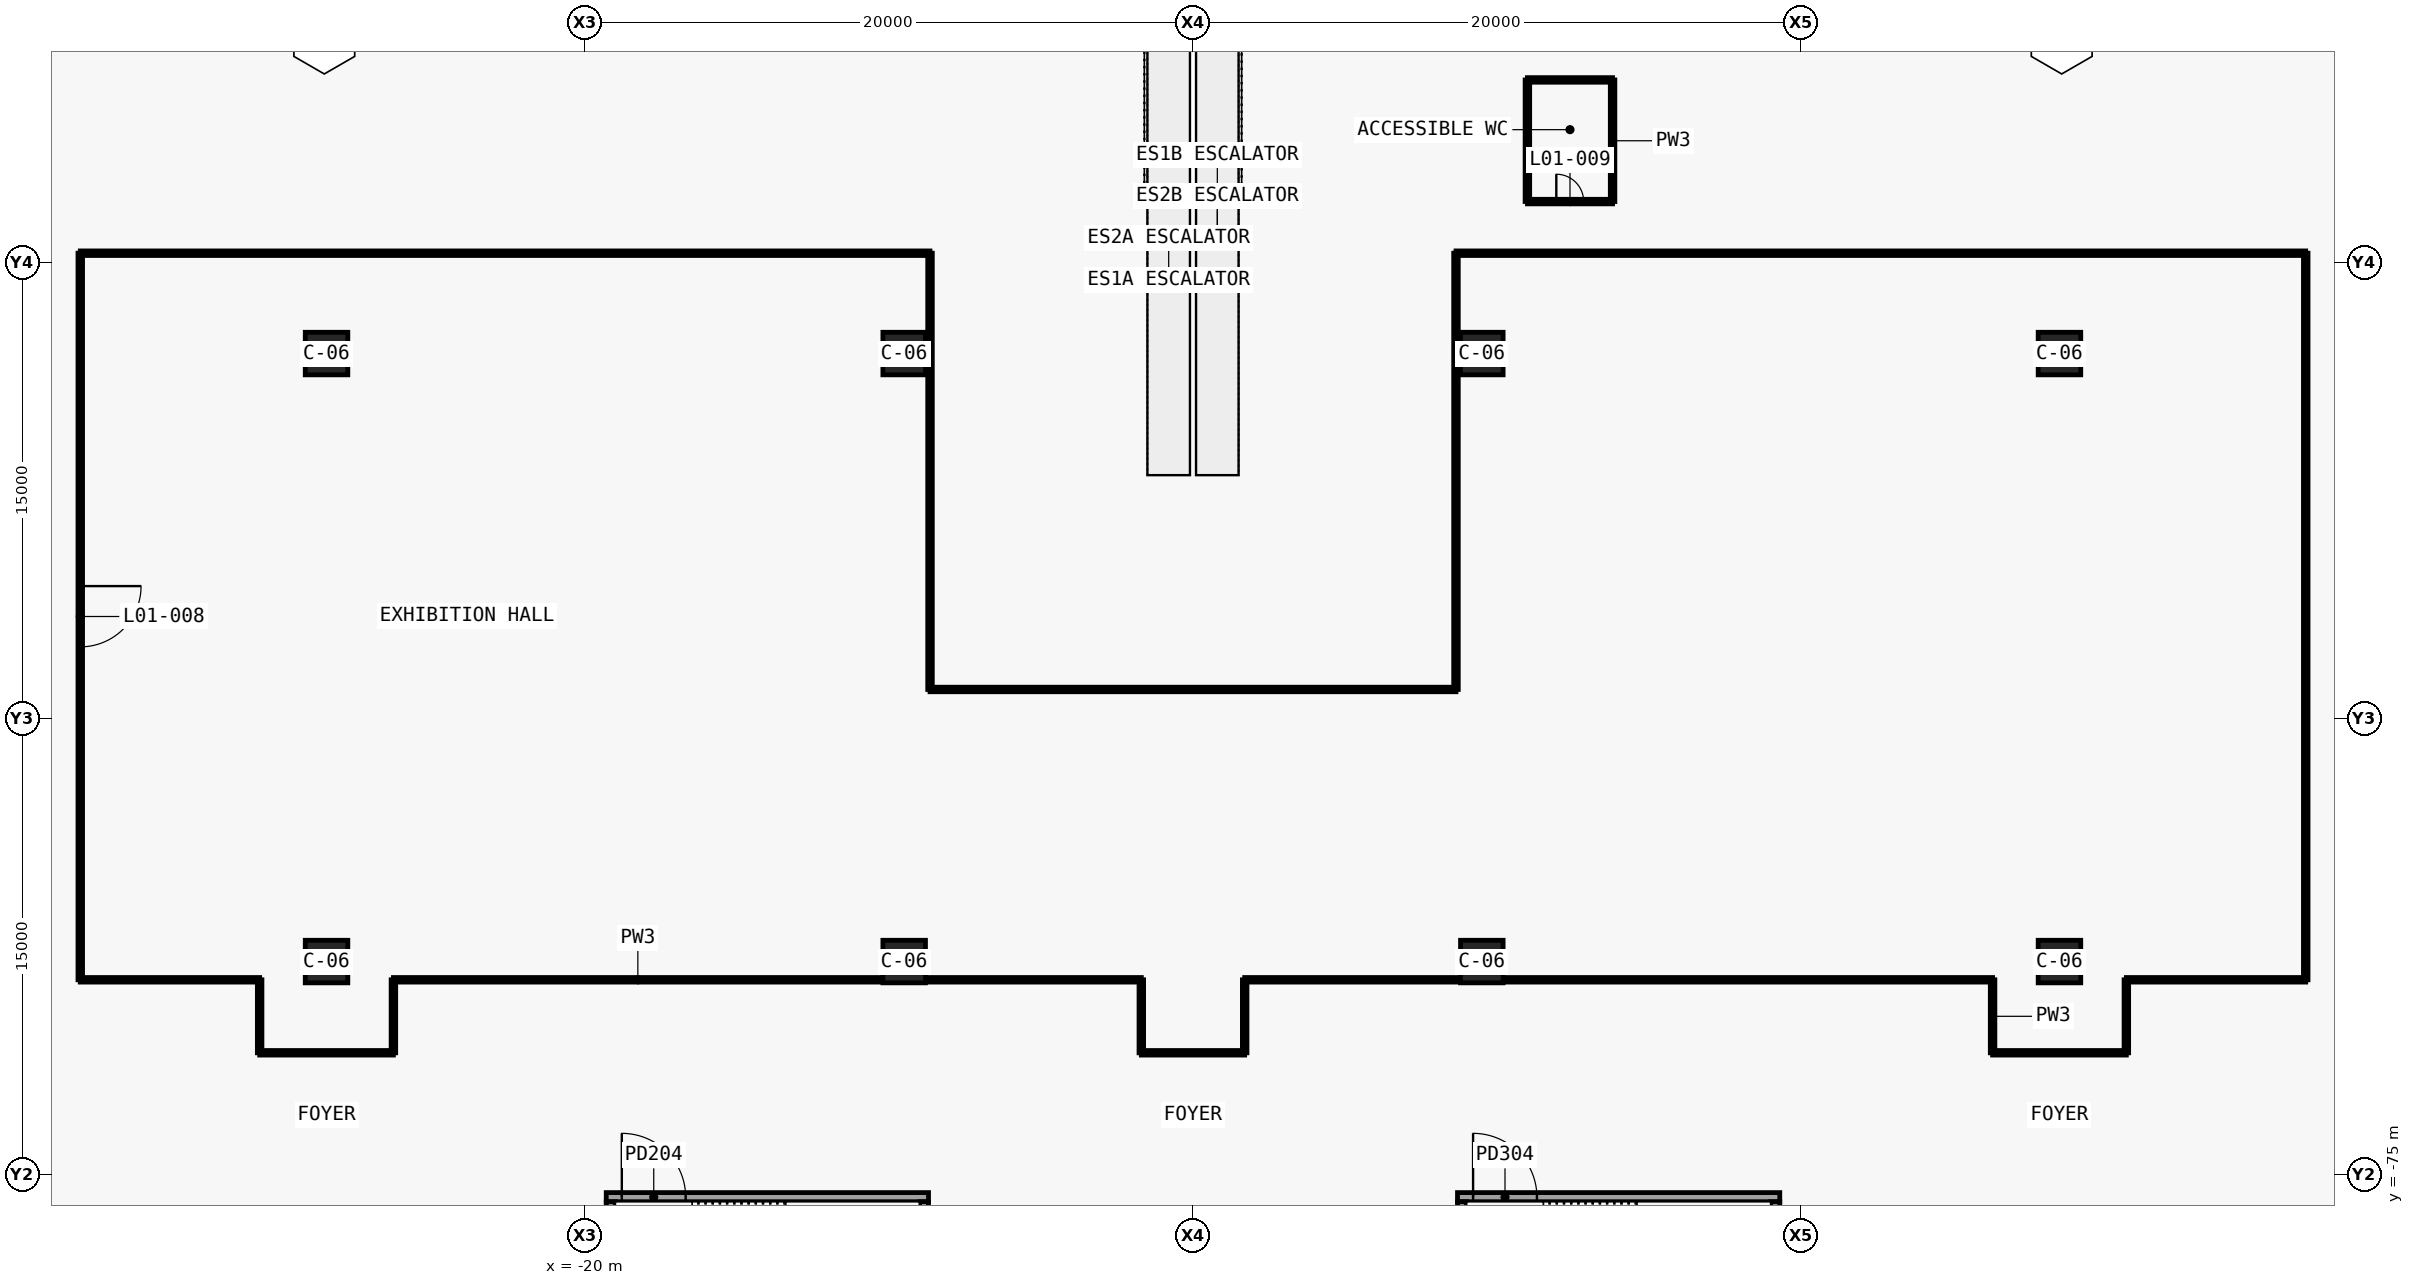
"""IFC4 building model, lengths in metres.
Left out: names, types, materials, properties, quantities, classifications, styles, units other than length and angle.
Written with IfcOpenShell. Run it as: python <this file> out.ifc"""

import sys

from ifc_helpers import new_model, si_unit, direction, frame, frame_2d, origin, origin_2d, place, context, subcontext, project, spatial, rectangle, extrude, element, fill, save


model = new_model("IFC4")
c1 = context("Model", 3, precision=1e-05, world=origin(), true_north=direction((0.0, 1.0)))
c2 = subcontext(c1, "Body", "Model", "MODEL_VIEW")
j1 = project(units=[si_unit("LENGTHUNIT", "METRE"), si_unit("PLANEANGLEUNIT", "RADIAN")], contexts=[c1])
p1 = place(None, origin())
s1 = spatial("IfcSite", under=j1, at=p1, CompositionType="ELEMENT")
p2 = place(p1, origin())
s2 = spatial("IfcBuilding", under=s1, at=p2, CompositionType="ELEMENT")
p3 = place(p2, frame((0.0, 0.0, 9.0)))
s3 = spatial("IfcBuildingStorey", under=s2, at=p3, CompositionType="ELEMENT", Elevation=9.0)
p4 = place(p3, frame((-19.3, -75.75, 0.0), z_axis=(0.0, 0.0, 1.0), x_axis=(1.0, 0.0, 0.0)))
e1 = element("IfcWall", 1, at=p4, inside=s3, PredefinedType="SOLIDWALL", context=c2, shape_type="SweptSolid", body=[
    extrude(rectangle(XDim=10.6, YDim=0.3, at=frame_2d((5.3, 0.0))), origin(), (0.0, 0.0, 1.0), 9.0),
])
p5 = place(p4, frame((0.512, 0.0, 0.0)))
e2 = element("IfcOpeningElement", 2, at=p5, cuts=e1, PredefinedType="OPENING", context=c2, shape_type="SweptSolid", body=[
    extrude(rectangle(XDim=2.1, YDim=2.1, at=frame_2d((1.05, 1.05))), frame((0.0, 0.16, 0.0), z_axis=(0.0, -1.0, 0.0), x_axis=(1.0, 0.0, 0.0)), (0.0, 0.0, 1.0), 0.32),
])
for number, where, z_axis, x_axis in (
    (3, (-19.15, -81.1, 0.0), (0.0, 0.0, 1.0), (0.0, 1.0, 0.0)),
    (4, (-8.85, -81.1, 0.0), (0.0, 0.0, 1.0), (0.0, 1.0, 0.0)),
):
    element("IfcWall", number, at=place(p3, frame(where, z_axis=z_axis, x_axis=x_axis)), inside=s3, PredefinedType="SOLIDWALL", context=c2, shape_type="SweptSolid", body=[
        extrude(rectangle(XDim=5.2, YDim=0.3, at=frame_2d((2.6, 0.0))), origin(), (0.0, 0.0, 1.0), 9.0),
    ])
p6 = place(p3, frame((8.7, -75.75, 0.0), z_axis=(0.0, 0.0, 1.0), x_axis=(1.0, 0.0, 0.0)))
e5 = element("IfcWall", 5, at=p6, inside=s3, PredefinedType="SOLIDWALL", context=c2, shape_type="SweptSolid", body=[
    extrude(rectangle(XDim=10.6, YDim=0.3, at=frame_2d((5.3, 0.0))), origin(), (0.0, 0.0, 1.0), 9.0),
])
p7 = place(p6, frame((0.512, 0.0, 0.0)))
e6 = element("IfcOpeningElement", 6, at=p7, cuts=e5, PredefinedType="OPENING", context=c2, shape_type="SweptSolid", body=[
    extrude(rectangle(XDim=2.1, YDim=2.1, at=frame_2d((1.05, 1.05))), frame((0.0, 0.16, 0.0), z_axis=(0.0, -1.0, 0.0), x_axis=(1.0, 0.0, 0.0)), (0.0, 0.0, 1.0), 0.32),
])
for number, where, z_axis, x_axis in (
    (7, (8.85, -81.1, 0.0), (0.0, 0.0, 1.0), (0.0, 1.0, 0.0)),
    (8, (19.15, -81.1, 0.0), (0.0, 0.0, 1.0), (0.0, 1.0, 0.0)),
):
    element("IfcWall", number, at=place(p3, frame(where, z_axis=z_axis, x_axis=x_axis)), inside=s3, PredefinedType="SOLIDWALL", context=c2, shape_type="SweptSolid", body=[
        extrude(rectangle(XDim=5.2, YDim=0.3, at=frame_2d((2.6, 0.0))), origin(), (0.0, 0.0, 1.0), 9.0),
    ])
for number, where, z_axis, x_axis in (
    (9, (-28.5, -68.0, 0.0), (0.0, 0.0, 1.0), (1.0, 0.0, 0.0)),
    (10, (-9.5, -68.0, 0.0), (0.0, 0.0, 1.0), (1.0, 0.0, 0.0)),
    (11, (9.5, -68.0, 0.0), (0.0, 0.0, 1.0), (1.0, 0.0, 0.0)),
    (12, (28.5, -68.0, 0.0), (0.0, 0.0, 1.0), (1.0, 0.0, 0.0)),
    (13, (-28.5, -48.0, 0.0), (0.0, 0.0, 1.0), (1.0, 0.0, 0.0)),
    (14, (-9.5, -48.0, 0.0), (0.0, 0.0, 1.0), (1.0, 0.0, 0.0)),
    (15, (9.5, -48.0, 0.0), (0.0, 0.0, 1.0), (1.0, 0.0, 0.0)),
    (16, (28.5, -48.0, 0.0), (0.0, 0.0, 1.0), (1.0, 0.0, 0.0)),
):
    element("IfcColumn", number, at=place(p3, frame(where, z_axis=z_axis, x_axis=x_axis)), inside=s3, PredefinedType="COLUMN", context=c2, shape_type="SweptSolid", body=[
        extrude(rectangle(XDim=1.4, YDim=1.4, at=origin_2d()), origin(), (0.0, 0.0, 1.0), 9.0),
    ])
for number, where, z_axis, x_axis in (
    (17, (36.599, -44.699, 0.0), (0.0, 0.0, 1.0), (-1.0, 0.0, 0.0)),
    (18, (-8.651, -44.699, 0.0), (0.0, 0.0, 1.0), (-1.0, 0.0, 0.0)),
):
    element("IfcWall", number, at=place(p3, frame(where, z_axis=z_axis, x_axis=x_axis)), inside=s3, PredefinedType="PARTITIONING", context=c2, shape_type="SweptSolid", body=[
        extrude(rectangle(XDim=27.948, YDim=0.15, at=frame_2d((13.974, 0.0))), origin(), (0.0, 0.0, 1.0), 7.58),
    ])
p8 = place(p3, frame((11.0, -43.001, 0.0), z_axis=(0.0, 0.0, 1.0), x_axis=(1.0, 0.0, 0.0)))
e19 = element("IfcWall", 19, at=p8, inside=s3, PredefinedType="PARTITIONING", context=c2, shape_type="SweptSolid", body=[
    extrude(rectangle(XDim=2.8, YDim=0.15, at=frame_2d((1.4, 0.0))), origin(), (0.0, 0.0, 1.0), 8.6),
])
p9 = place(p8, frame((0.95, 0.0, 0.0)))
e20 = element("IfcOpeningElement", 20, at=p9, cuts=e19, PredefinedType="OPENING", context=c2, shape_type="SweptSolid", body=[
    extrude(rectangle(XDim=0.9, YDim=2.1, at=frame_2d((0.45, 1.05))), frame((0.0, 0.085, 0.0), z_axis=(0.0, -1.0, 0.0), x_axis=(1.0, 0.0, 0.0)), (0.0, 0.0, 1.0), 0.17),
])
p10 = place(p3, frame((13.801, -43.0, 0.0), z_axis=(0.0, 0.0, 1.0), x_axis=(0.0, 1.0, 0.0)))
e21 = element("IfcWall", 21, at=p10, inside=s3, PredefinedType="PARTITIONING", context=c2, shape_type="SweptSolid", body=[
    extrude(rectangle(XDim=4.0, YDim=0.15, at=frame_2d((2.0, 0.0))), origin(), (0.0, 0.0, 1.0), 8.6),
])
p11 = place(p3, frame((13.8, -38.999, 0.0), z_axis=(0.0, 0.0, 1.0), x_axis=(-1.0, 0.0, 0.0)))
e22 = element("IfcWall", 22, at=p11, inside=s3, PredefinedType="PARTITIONING", context=c2, shape_type="SweptSolid", body=[
    extrude(rectangle(XDim=2.8, YDim=0.15, at=frame_2d((1.4, 0.0))), origin(), (0.0, 0.0, 1.0), 8.6),
])
p12 = place(p3, frame((10.999, -39.0, 0.0), z_axis=(0.0, 0.0, 1.0), x_axis=(0.0, -1.0, 0.0)))
e23 = element("IfcWall", 23, at=p12, inside=s3, PredefinedType="PARTITIONING", context=c2, shape_type="SweptSolid", body=[
    extrude(rectangle(XDim=4.0, YDim=0.15, at=frame_2d((2.0, 0.0))), origin(), (0.0, 0.0, 1.0), 8.6),
])
p13 = place(p3, frame((26.301, -71.001, 0.0), z_axis=(0.0, 0.0, 1.0), x_axis=(1.0, 0.0, 0.0)))
e24 = element("IfcWall", 24, at=p13, inside=s3, PredefinedType="PARTITIONING", context=c2, shape_type="SweptSolid", body=[
    extrude(rectangle(XDim=4.398, YDim=0.15, at=frame_2d((2.199, 0.0))), origin(), (0.0, 0.0, 1.0), 7.58),
])
p14 = place(p3, frame((-1.699, -71.001, 0.0), z_axis=(0.0, 0.0, 1.0), x_axis=(1.0, 0.0, 0.0)))
e25 = element("IfcWall", 25, at=p14, inside=s3, PredefinedType="PARTITIONING", context=c2, shape_type="SweptSolid", body=[
    extrude(rectangle(XDim=3.398, YDim=0.15, at=frame_2d((1.699, 0.0))), origin(), (0.0, 0.0, 1.0), 8.6),
])
p15 = place(p3, frame((-30.699, -71.001, 0.0), z_axis=(0.0, 0.0, 1.0), x_axis=(1.0, 0.0, 0.0)))
e26 = element("IfcWall", 26, at=p15, inside=s3, PredefinedType="PARTITIONING", context=c2, shape_type="SweptSolid", body=[
    extrude(rectangle(XDim=4.398, YDim=0.15, at=frame_2d((2.199, 0.0))), origin(), (0.0, 0.0, 1.0), 7.58),
])
p16 = place(p3, frame((-36.6, -44.698, 0.0), z_axis=(0.0, 0.0, 1.0), x_axis=(0.0, -1.0, 0.0)))
e27 = element("IfcWall", 27, at=p16, inside=s3, PredefinedType="PARTITIONING", context=c2, shape_type="SweptSolid", body=[
    extrude(rectangle(XDim=23.902, YDim=0.15, at=frame_2d((11.951, 0.0))), origin(), (0.0, 0.0, 1.0), 7.58),
])
p17 = place(p16, frame((10.951, 0.0, 0.0)))
e28 = element("IfcOpeningElement", 28, at=p17, cuts=e27, PredefinedType="OPENING", context=c2, shape_type="SweptSolid", body=[
    extrude(rectangle(XDim=2.0, YDim=2.4, at=frame_2d((1.0, 1.2))), frame((0.0, 0.085, 0.0), z_axis=(0.0, -1.0, 0.0), x_axis=(1.0, 0.0, 0.0)), (0.0, 0.0, 1.0), 0.17),
])
p18 = place(p3, frame((-36.6, -68.6, 0.0), z_axis=(0.0, 0.0, 1.0), x_axis=(1.0, 0.0, 0.0)))
e29 = element("IfcWall", 29, at=p18, inside=s3, PredefinedType="PARTITIONING", context=c2, shape_type="SweptSolid", body=[
    extrude(rectangle(XDim=5.9, YDim=0.15, at=frame_2d((2.95, 0.0))), origin(), (0.0, 0.0, 1.0), 8.6),
])
for number, where, z_axis, x_axis in (
    (30, (-30.7, -68.6, 0.0), (0.0, 0.0, 1.0), (0.0, -1.0, 0.0)),
    (31, (-26.3, -71.002, 0.0), (0.0, 0.0, 1.0), (0.0, 1.0, 0.0)),
):
    element("IfcWall", number, at=place(p3, frame(where, z_axis=z_axis, x_axis=x_axis)), inside=s3, PredefinedType="PARTITIONING", context=c2, shape_type="SweptSolid", body=[
        extrude(rectangle(XDim=2.402, YDim=0.15, at=frame_2d((1.201, 0.0))), origin(), (0.0, 0.0, 1.0), 8.6),
    ])
p19 = place(p3, frame((-26.3, -68.6, 0.0), z_axis=(0.0, 0.0, 1.0), x_axis=(1.0, 0.0, 0.0)))
e32 = element("IfcWall", 32, at=p19, inside=s3, PredefinedType="PARTITIONING", context=c2, shape_type="SweptSolid", body=[
    extrude(rectangle(XDim=16.08, YDim=0.15, at=frame_2d((8.04, 0.0))), origin(), (0.0, 0.0, 1.0), 8.6),
])
p20 = place(p3, frame((-8.78, -68.6, 0.0), z_axis=(0.0, 0.0, 1.0), x_axis=(1.0, 0.0, 0.0)))
e33 = element("IfcWall", 33, at=p20, inside=s3, PredefinedType="PARTITIONING", context=c2, shape_type="SweptSolid", body=[
    extrude(rectangle(XDim=7.08, YDim=0.15, at=frame_2d((3.54, 0.0))), origin(), (0.0, 0.0, 1.0), 8.6),
])
for number, where, z_axis, x_axis in (
    (34, (-1.7, -68.6, 0.0), (0.0, 0.0, 1.0), (0.0, -1.0, 0.0)),
    (35, (1.7, -71.002, 0.0), (0.0, 0.0, 1.0), (0.0, 1.0, 0.0)),
):
    element("IfcWall", number, at=place(p3, frame(where, z_axis=z_axis, x_axis=x_axis)), inside=s3, PredefinedType="PARTITIONING", context=c2, shape_type="SweptSolid", body=[
        extrude(rectangle(XDim=2.402, YDim=0.15, at=frame_2d((1.201, 0.0))), origin(), (0.0, 0.0, 1.0), 8.6),
    ])
p21 = place(p3, frame((1.7, -68.6, 0.0), z_axis=(0.0, 0.0, 1.0), x_axis=(1.0, 0.0, 0.0)))
e36 = element("IfcWall", 36, at=p21, inside=s3, PredefinedType="PARTITIONING", context=c2, shape_type="SweptSolid", body=[
    extrude(rectangle(XDim=7.08, YDim=0.15, at=frame_2d((3.54, 0.0))), origin(), (0.0, 0.0, 1.0), 8.6),
])
p22 = place(p3, frame((10.22, -68.6, 0.0), z_axis=(0.0, 0.0, 1.0), x_axis=(1.0, 0.0, 0.0)))
e37 = element("IfcWall", 37, at=p22, inside=s3, PredefinedType="PARTITIONING", context=c2, shape_type="SweptSolid", body=[
    extrude(rectangle(XDim=16.08, YDim=0.15, at=frame_2d((8.04, 0.0))), origin(), (0.0, 0.0, 1.0), 8.6),
])
for number, where, z_axis, x_axis in (
    (38, (26.3, -68.6, 0.0), (0.0, 0.0, 1.0), (0.0, -1.0, 0.0)),
    (39, (30.7, -71.002, 0.0), (0.0, 0.0, 1.0), (0.0, 1.0, 0.0)),
):
    element("IfcWall", number, at=place(p3, frame(where, z_axis=z_axis, x_axis=x_axis)), inside=s3, PredefinedType="PARTITIONING", context=c2, shape_type="SweptSolid", body=[
        extrude(rectangle(XDim=2.402, YDim=0.15, at=frame_2d((1.201, 0.0))), origin(), (0.0, 0.0, 1.0), 8.6),
    ])
p23 = place(p3, frame((30.7, -68.6, 0.0), z_axis=(0.0, 0.0, 1.0), x_axis=(1.0, 0.0, 0.0)))
e40 = element("IfcWall", 40, at=p23, inside=s3, PredefinedType="PARTITIONING", context=c2, shape_type="SweptSolid", body=[
    extrude(rectangle(XDim=5.9, YDim=0.15, at=frame_2d((2.95, 0.0))), origin(), (0.0, 0.0, 1.0), 8.6),
])
p24 = place(p3, frame((36.6, -68.6, 0.0), z_axis=(0.0, 0.0, 1.0), x_axis=(0.0, 1.0, 0.0)))
e41 = element("IfcWall", 41, at=p24, inside=s3, PredefinedType="PARTITIONING", context=c2, shape_type="SweptSolid", body=[
    extrude(rectangle(XDim=23.902, YDim=0.15, at=frame_2d((11.951, 0.0))), origin(), (0.0, 0.0, 1.0), 7.58),
])
p25 = place(p3, frame((8.65, -59.05, 0.0), z_axis=(0.0, 0.0, 1.0), x_axis=(-1.0, 0.0, 0.0)))
e42 = element("IfcWall", 42, at=p25, inside=s3, PredefinedType="PARTITIONING", context=c2, shape_type="SweptSolid", body=[
    extrude(rectangle(XDim=17.3, YDim=0.15, at=frame_2d((8.65, 0.0))), origin(), (0.0, 0.0, 1.0), 8.6),
])
for number, where, z_axis, x_axis in (
    (43, (-8.65, -59.05, 0.0), (0.0, 0.0, 1.0), (0.0, 1.0, 0.0)),
    (44, (8.65, -44.698, 0.0), (0.0, 0.0, 1.0), (0.0, -1.0, 0.0)),
):
    element("IfcWall", number, at=place(p3, frame(where, z_axis=z_axis, x_axis=x_axis)), inside=s3, PredefinedType="PARTITIONING", context=c2, shape_type="SweptSolid", body=[
        extrude(rectangle(XDim=14.352, YDim=0.15, at=frame_2d((7.176, 0.0))), origin(), (0.0, 0.0, 1.0), 7.58),
    ])
p26 = place(p5, origin())
e45 = element("IfcDoor", 45, at=p26, inside=s3, OperationType="DOUBLE_DOOR_SINGLE_SWING", PredefinedType="DOOR", context=c2, shape_type="SweptSolid", body=[
    extrude(rectangle(XDim=2.1, YDim=2.1, at=frame_2d((1.05, 1.05))), frame((0.0, 0.025, 0.0), z_axis=(0.0, -1.0, 0.0), x_axis=(1.0, 0.0, 0.0)), (0.0, 0.0, 1.0), 0.05),
])
fill(e2, e45)
p27 = place(p7, origin())
e46 = element("IfcDoor", 46, at=p27, inside=s3, OperationType="DOUBLE_DOOR_SINGLE_SWING", PredefinedType="DOOR", context=c2, shape_type="SweptSolid", body=[
    extrude(rectangle(XDim=2.1, YDim=2.1, at=frame_2d((1.05, 1.05))), frame((0.0, 0.025, 0.0), z_axis=(0.0, -1.0, 0.0), x_axis=(1.0, 0.0, 0.0)), (0.0, 0.0, 1.0), 0.05),
])
fill(e6, e46)
p28 = place(p17, origin())
e47 = element("IfcDoor", 47, at=p28, inside=s3, OperationType="DOUBLE_DOOR_SINGLE_SWING", PredefinedType="DOOR", context=c2, shape_type="SweptSolid", body=[
    extrude(rectangle(XDim=2.0, YDim=2.4, at=frame_2d((1.0, 1.2))), frame((0.0, 0.025, 0.0), z_axis=(0.0, -1.0, 0.0), x_axis=(1.0, 0.0, 0.0)), (0.0, 0.0, 1.0), 0.05),
])
fill(e28, e47)
p29 = place(p9, origin())
e48 = element("IfcDoor", 48, at=p29, inside=s3, OperationType="SINGLE_SWING_LEFT", PredefinedType="DOOR", context=c2, shape_type="SweptSolid", body=[
    extrude(rectangle(XDim=0.9, YDim=2.1, at=frame_2d((0.45, 1.05))), frame((0.0, 0.025, 0.0), z_axis=(0.0, -1.0, 0.0), x_axis=(1.0, 0.0, 0.0)), (0.0, 0.0, 1.0), 0.05),
])
fill(e20, e48)
save(model, sys.argv[1])
